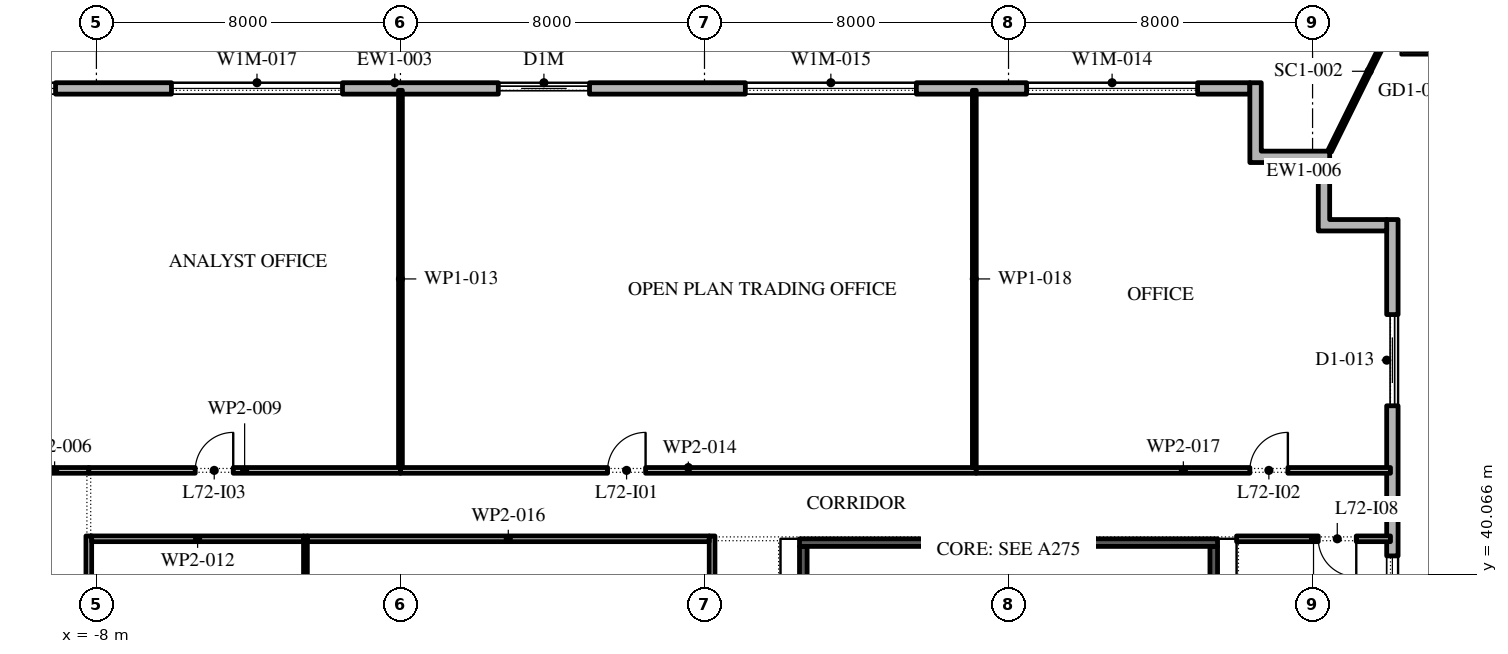
"""IFC4 building model, lengths in metres.
Left out: names, types, materials, properties, quantities, classifications, styles, units other than length and angle.
Written with IfcOpenShell. Run it as: python <this file> out.ifc"""

import sys

from ifc_helpers import new_model, si_unit, direction, frame, frame_2d, origin, place, context, subcontext, project, spatial, polyline, rectangle, outline, extrude, element, fill, save


model = new_model("IFC4")
c1 = context("Model", 3, precision=1e-05, world=origin(), true_north=direction((0.0, 1.0)))
c2 = subcontext(c1, "Body", "Model", "MODEL_VIEW")
j1 = project(units=[si_unit("LENGTHUNIT", "METRE"), si_unit("PLANEANGLEUNIT", "RADIAN")], contexts=[c1])
p1 = place(None, origin())
s1 = spatial("IfcSite", under=j1, at=p1, CompositionType="ELEMENT")
p2 = place(p1, origin())
s2 = spatial("IfcBuilding", under=s1, at=p2, CompositionType="ELEMENT")
p3 = place(p2, frame((0.0, 0.0, 330.0)))
s3 = spatial("IfcBuildingStorey", under=s2, at=p3, CompositionType="ELEMENT", Elevation=330.0)
p4 = place(p3, frame((26.1, -2.1, 0.0), z_axis=(0.0, 0.0, 1.0), x_axis=(0.0, 1.0, 0.0)))
e1 = element("IfcWall", 1, at=p4, inside=s3, PredefinedType="STANDARD", context=c2, shape_type="SweptSolid", body=[
    extrude(rectangle(XDim=51.5, YDim=0.3, at=frame_2d((25.75, 0.0))), origin(), (0.0, 0.0, 1.0), 4.0),
])
p5 = place(p4, frame((1.3, 0.0, 0.45)))
e2 = element("IfcOpeningElement", 2, at=p5, cuts=e1, PredefinedType="OPENING", context=c2, shape_type="SweptSolid", body=[
    extrude(rectangle(XDim=4.5, YDim=3.05, at=frame_2d((2.25, 1.525))), frame((0.0, 0.16, 0.0), z_axis=(0.0, -1.0, 0.0), x_axis=(1.0, 0.0, 0.0)), (0.0, 0.0, 1.0), 0.32),
])
p6 = place(p4, frame((8.55, 0.0, 0.45)))
e3 = element("IfcOpeningElement", 3, at=p6, cuts=e1, PredefinedType="OPENING", context=c2, shape_type="SweptSolid", body=[
    extrude(rectangle(XDim=4.5, YDim=3.05, at=frame_2d((2.25, 1.525))), frame((0.0, 0.16, 0.0), z_axis=(0.0, -1.0, 0.0), x_axis=(1.0, 0.0, 0.0)), (0.0, 0.0, 1.0), 0.32),
])
p7 = place(p4, frame((17.0, 0.0, 0.0)))
e4 = element("IfcOpeningElement", 4, at=p7, cuts=e1, PredefinedType="OPENING", context=c2, shape_type="SweptSolid", body=[
    extrude(rectangle(XDim=2.4, YDim=3.5, at=frame_2d((1.2, 1.75))), frame((0.0, 0.16, 0.0), z_axis=(0.0, -1.0, 0.0), x_axis=(1.0, 0.0, 0.0)), (0.0, 0.0, 1.0), 0.32),
])
p8 = place(p4, frame((23.35, 0.0, 0.45)))
e5 = element("IfcOpeningElement", 5, at=p8, cuts=e1, PredefinedType="OPENING", context=c2, shape_type="SweptSolid", body=[
    extrude(rectangle(XDim=4.5, YDim=3.05, at=frame_2d((2.25, 1.525))), frame((0.0, 0.16, 0.0), z_axis=(0.0, -1.0, 0.0), x_axis=(1.0, 0.0, 0.0)), (0.0, 0.0, 1.0), 0.32),
])
p9 = place(p4, frame((30.75, 0.0, 0.45)))
e6 = element("IfcOpeningElement", 6, at=p9, cuts=e1, PredefinedType="OPENING", context=c2, shape_type="SweptSolid", body=[
    extrude(rectangle(XDim=4.5, YDim=3.05, at=frame_2d((2.25, 1.525))), frame((0.0, 0.16, 0.0), z_axis=(0.0, -1.0, 0.0), x_axis=(1.0, 0.0, 0.0)), (0.0, 0.0, 1.0), 0.32),
])
p10 = place(p4, frame((38.15, 0.0, 0.45)))
e7 = element("IfcOpeningElement", 7, at=p10, cuts=e1, PredefinedType="OPENING", context=c2, shape_type="SweptSolid", body=[
    extrude(rectangle(XDim=4.5, YDim=3.05, at=frame_2d((2.25, 1.525))), frame((0.0, 0.16, 0.0), z_axis=(0.0, -1.0, 0.0), x_axis=(1.0, 0.0, 0.0)), (0.0, 0.0, 1.0), 0.32),
])
p11 = place(p4, frame((46.6, 0.0, 0.0)))
e8 = element("IfcOpeningElement", 8, at=p11, cuts=e1, PredefinedType="OPENING", context=c2, shape_type="SweptSolid", body=[
    extrude(rectangle(XDim=2.4, YDim=3.5, at=frame_2d((1.2, 1.75))), frame((0.0, 0.16, 0.0), z_axis=(0.0, -1.0, 0.0), x_axis=(1.0, 0.0, 0.0)), (0.0, 0.0, 1.0), 0.32),
])
p12 = place(p3, frame((22.35, 52.85, 0.0), z_axis=(0.0, 0.0, 1.0), x_axis=(-1.0, 0.0, 0.0)))
e9 = element("IfcWall", 9, at=p12, inside=s3, PredefinedType="STANDARD", context=c2, shape_type="SweptSolid", body=[
    extrude(rectangle(XDim=45.0, YDim=0.3, at=frame_2d((22.5, 0.0))), origin(), (0.0, 0.0, 1.0), 4.0),
])
p13 = place(p12, frame((1.375, 0.0, 0.45)))
e10 = element("IfcOpeningElement", 10, at=p13, cuts=e9, PredefinedType="OPENING", context=c2, shape_type="SweptSolid", body=[
    extrude(rectangle(XDim=4.5, YDim=2.575, at=frame_2d((2.25, 1.288))), frame((0.0, 0.16, 0.0), z_axis=(0.0, -1.0, 0.0), x_axis=(1.0, 0.0, 0.0)), (0.0, 0.0, 1.0), 0.32),
])
p14 = place(p12, frame((8.775, 0.0, 0.45)))
e11 = element("IfcOpeningElement", 11, at=p14, cuts=e9, PredefinedType="OPENING", context=c2, shape_type="SweptSolid", body=[
    extrude(rectangle(XDim=4.5, YDim=2.575, at=frame_2d((2.25, 1.288))), frame((0.0, 0.16, 0.0), z_axis=(0.0, -1.0, 0.0), x_axis=(1.0, 0.0, 0.0)), (0.0, 0.0, 1.0), 0.32),
])
p15 = place(p12, frame((17.375, 0.0, 0.0)))
e12 = element("IfcOpeningElement", 12, at=p15, cuts=e9, PredefinedType="OPENING", context=c2, shape_type="SweptSolid", body=[
    extrude(rectangle(XDim=2.4, YDim=3.025, at=frame_2d((1.2, 1.512))), frame((0.0, 0.16, 0.0), z_axis=(0.0, -1.0, 0.0), x_axis=(1.0, 0.0, 0.0)), (0.0, 0.0, 1.0), 0.32),
])
p16 = place(p12, frame((23.875, 0.0, 0.45)))
e13 = element("IfcOpeningElement", 13, at=p16, cuts=e9, PredefinedType="OPENING", context=c2, shape_type="SweptSolid", body=[
    extrude(rectangle(XDim=4.5, YDim=2.575, at=frame_2d((2.25, 1.288))), frame((0.0, 0.16, 0.0), z_axis=(0.0, -1.0, 0.0), x_axis=(1.0, 0.0, 0.0)), (0.0, 0.0, 1.0), 0.32),
])
p17 = place(p12, frame((31.425, 0.0, 0.45)))
e14 = element("IfcOpeningElement", 14, at=p17, cuts=e9, PredefinedType="OPENING", context=c2, shape_type="SweptSolid", body=[
    extrude(rectangle(XDim=4.5, YDim=2.575, at=frame_2d((2.25, 1.288))), frame((0.0, 0.16, 0.0), z_axis=(0.0, -1.0, 0.0), x_axis=(1.0, 0.0, 0.0)), (0.0, 0.0, 1.0), 0.32),
])
p18 = place(p12, frame((38.975, 0.0, 0.45)))
e15 = element("IfcOpeningElement", 15, at=p18, cuts=e9, PredefinedType="OPENING", context=c2, shape_type="SweptSolid", body=[
    extrude(rectangle(XDim=4.5, YDim=2.575, at=frame_2d((2.25, 1.288))), frame((0.0, 0.16, 0.0), z_axis=(0.0, -1.0, 0.0), x_axis=(1.0, 0.0, 0.0)), (0.0, 0.0, 1.0), 0.32),
])
p19 = place(p3, origin())
e16 = element("IfcWall", 16, at=p19, inside=s3, PredefinedType="STANDARD", context=c2, shape_type="SweptSolid", body=[
    extrude(outline(polyline([(24.15, 50.9), (22.35, 50.9), (22.35, 53.0), (22.65, 53.0), (22.65, 51.2), (24.45, 51.2), (24.45, 49.4), (25.95, 49.4), (25.95, 49.1), (24.15, 49.1), (24.15, 50.9)])), origin(), (0.0, 0.0, 1.0), 4.0),
])
p20 = place(p3, frame((24.45, 51.2, -0.05), z_axis=(0.0, 0.0, 1.0), x_axis=(0.443209769794, 0.896417927063, 0.0)))
e17 = element("IfcWall", 17, at=p20, inside=s3, PredefinedType="STANDARD", context=c2, shape_type="SweptSolid", body=[
    extrude(rectangle(XDim=4.688, YDim=0.1, at=frame_2d((2.344, 0.0))), origin(), (0.0, 0.0, 1.0), 4.05),
])
p21 = place(p3, frame((21.4, 25.75, 0.0), z_axis=(0.0, 0.0, 1.0), x_axis=(0.0, 1.0, 0.0)))
e18 = element("IfcWall", 18, at=p21, inside=s3, PredefinedType="SHEAR", context=c2, shape_type="SweptSolid", body=[
    extrude(rectangle(XDim=15.05, YDim=0.2, at=frame_2d((7.525, 0.0))), origin(), (0.0, 0.0, 1.0), 4.0),
])
p22 = place(p3, frame((10.6, 25.75, 0.0), z_axis=(0.0, 0.0, 1.0), x_axis=(0.0, 1.0, 0.0)))
e19 = element("IfcWall", 19, at=p22, inside=s3, PredefinedType="SHEAR", context=c2, shape_type="SweptSolid", body=[
    extrude(rectangle(XDim=15.05, YDim=0.2, at=frame_2d((7.525, 0.0))), origin(), (0.0, 0.0, 1.0), 4.0),
])
p23 = place(p22, frame((3.288, 0.0, 0.0)))
e20 = element("IfcOpeningElement", 20, at=p23, cuts=e19, PredefinedType="OPENING", context=c2, shape_type="SweptSolid", body=[
    extrude(rectangle(XDim=0.9, YDim=2.1, at=frame_2d((0.45, 1.05))), frame((0.0, 0.11, 0.0), z_axis=(0.0, -1.0, 0.0), x_axis=(1.0, 0.0, 0.0)), (0.0, 0.0, 1.0), 0.22),
])
p24 = place(p22, frame((10.887, 0.0, 0.0)))
e21 = element("IfcOpeningElement", 21, at=p24, cuts=e19, PredefinedType="OPENING", context=c2, shape_type="SweptSolid", body=[
    extrude(rectangle(XDim=0.9, YDim=2.1, at=frame_2d((0.45, 1.05))), frame((0.0, 0.11, 0.0), z_axis=(0.0, -1.0, 0.0), x_axis=(1.0, 0.0, 0.0)), (0.0, 0.0, 1.0), 0.22),
])
p25 = place(p3, frame((10.5, 40.9, 0.0), z_axis=(0.0, 0.0, 1.0), x_axis=(1.0, 0.0, 0.0)))
e22 = element("IfcWall", 22, at=p25, inside=s3, PredefinedType="SHEAR", context=c2, shape_type="SweptSolid", body=[
    extrude(rectangle(XDim=11.0, YDim=0.2, at=frame_2d((5.5, 0.0))), origin(), (0.0, 0.0, 1.0), 4.0),
])
p26 = place(p3, frame((-10.0, 42.8, 0.0), z_axis=(0.0, 0.0, 1.0), x_axis=(1.0, 0.0, 0.0)))
e23 = element("IfcWall", 23, at=p26, inside=s3, PredefinedType="PARTITIONING", context=c2, shape_type="SweptSolid", body=[
    extrude(rectangle(XDim=1.8, YDim=0.15, at=frame_2d((0.9, 0.0))), origin(), (0.0, 0.0, 1.0), 4.0),
])
p27 = place(p3, frame((-8.2, 41.075, 0.0), z_axis=(0.0, 0.0, 1.0), x_axis=(0.0, -1.0, 0.0)))
e24 = element("IfcWall", 24, at=p27, inside=s3, PredefinedType="PARTITIONING", context=c2, shape_type="SweptSolid", body=[
    extrude(rectangle(XDim=22.0, YDim=0.15, at=frame_2d((11.0, 0.0))), origin(), (0.0, 0.0, 1.0), 4.0),
])
p28 = place(p27, frame((10.675, 0.0, 0.0)))
e25 = element("IfcOpeningElement", 25, at=p28, cuts=e24, PredefinedType="OPENING", context=c2, shape_type="SweptSolid", body=[
    extrude(rectangle(XDim=1.0, YDim=2.1, at=frame_2d((0.5, 1.05))), frame((0.0, 0.085, 0.0), z_axis=(0.0, -1.0, 0.0), x_axis=(1.0, 0.0, 0.0)), (0.0, 0.0, 1.0), 0.17),
])
p29 = place(p3, frame((-8.2, 42.8, 0.0), z_axis=(0.0, 0.0, 1.0), x_axis=(1.0, 0.0, 0.0)))
e26 = element("IfcWall", 26, at=p29, inside=s3, PredefinedType="PARTITIONING", context=c2, shape_type="SweptSolid", body=[
    extrude(rectangle(XDim=8.2, YDim=0.15, at=frame_2d((4.1, 0.0))), origin(), (0.0, 0.0, 1.0), 4.0),
])
p30 = place(p29, frame((2.8, 0.0, 0.0)))
e27 = element("IfcOpeningElement", 27, at=p30, cuts=e26, PredefinedType="OPENING", context=c2, shape_type="SweptSolid", body=[
    extrude(rectangle(XDim=1.0, YDim=2.1, at=frame_2d((0.5, 1.05))), frame((0.0, 0.085, 0.0), z_axis=(0.0, -1.0, 0.0), x_axis=(1.0, 0.0, 0.0)), (0.0, 0.0, 1.0), 0.17),
])
p31 = place(p3, frame((-2.5, 19.075, 0.0), z_axis=(0.0, 0.0, 1.0), x_axis=(0.0, 1.0, 0.0)))
e28 = element("IfcWall", 28, at=p31, inside=s3, PredefinedType="PARTITIONING", context=c2, shape_type="SweptSolid", body=[
    extrude(rectangle(XDim=22.0, YDim=0.1, at=frame_2d((11.0, 0.0))), origin(), (0.0, 0.0, 1.0), 4.0),
])
p32 = place(p3, frame((-2.55, 41.0, 0.0), z_axis=(0.0, 0.0, 1.0), x_axis=(-1.0, 0.0, 0.0)))
e29 = element("IfcWall", 29, at=p32, inside=s3, PredefinedType="PARTITIONING", context=c2, shape_type="SweptSolid", body=[
    extrude(rectangle(XDim=5.575, YDim=0.15, at=frame_2d((2.788, 0.0))), origin(), (0.0, 0.0, 1.0), 4.0),
])
p33 = place(p3, frame((0.0, 42.875, 0.0), z_axis=(0.0, 0.0, 1.0), x_axis=(0.0, 1.0, 0.0)))
e30 = element("IfcWall", 30, at=p33, inside=s3, PredefinedType="PARTITIONING", context=c2, shape_type="SweptSolid", body=[
    extrude(rectangle(XDim=9.925, YDim=0.1, at=frame_2d((4.962, 0.0))), origin(), (0.0, 0.0, 1.0), 4.0),
])
p34 = place(p3, frame((0.0, 42.8, 0.0), z_axis=(0.0, 0.0, 1.0), x_axis=(1.0, 0.0, 0.0)))
e31 = element("IfcWall", 31, at=p34, inside=s3, PredefinedType="PARTITIONING", context=c2, shape_type="SweptSolid", body=[
    extrude(rectangle(XDim=15.15, YDim=0.15, at=frame_2d((7.575, 0.0))), origin(), (0.0, 0.0, 1.0), 4.0),
])
p35 = place(p34, frame((5.45, 0.0, 0.0)))
e32 = element("IfcOpeningElement", 32, at=p35, cuts=e31, PredefinedType="OPENING", context=c2, shape_type="SweptSolid", body=[
    extrude(rectangle(XDim=1.0, YDim=2.1, at=frame_2d((0.5, 1.05))), frame((0.0, 0.085, 0.0), z_axis=(0.0, -1.0, 0.0), x_axis=(1.0, 0.0, 0.0)), (0.0, 0.0, 1.0), 0.17),
])
p36 = place(p3, frame((8.2, 19.075, 0.0), z_axis=(0.0, 0.0, 1.0), x_axis=(0.0, 1.0, 0.0)))
e33 = element("IfcWall", 33, at=p36, inside=s3, PredefinedType="PARTITIONING", context=c2, shape_type="SweptSolid", body=[
    extrude(rectangle(XDim=22.0, YDim=0.15, at=frame_2d((11.0, 0.0))), origin(), (0.0, 0.0, 1.0), 4.0),
])
p37 = place(p36, frame((7.725, 0.0, 0.0)))
e34 = element("IfcOpeningElement", 34, at=p37, cuts=e33, PredefinedType="OPENING", context=c2, shape_type="SweptSolid", body=[
    extrude(rectangle(XDim=1.8, YDim=2.1, at=frame_2d((0.9, 1.05))), frame((0.0, 0.085, 0.0), z_axis=(0.0, -1.0, 0.0), x_axis=(1.0, 0.0, 0.0)), (0.0, 0.0, 1.0), 0.17),
])
p38 = place(p3, frame((8.125, 41.0, 0.0), z_axis=(0.0, 0.0, 1.0), x_axis=(-1.0, 0.0, 0.0)))
e35 = element("IfcWall", 35, at=p38, inside=s3, PredefinedType="PARTITIONING", context=c2, shape_type="SweptSolid", body=[
    extrude(rectangle(XDim=10.575, YDim=0.15, at=frame_2d((5.288, 0.0))), origin(), (0.0, 0.0, 1.0), 4.0),
])
p39 = place(p3, frame((15.15, 42.8, 0.0), z_axis=(0.0, 0.0, 1.0), x_axis=(1.0, 0.0, 0.0)))
e36 = element("IfcWall", 36, at=p39, inside=s3, PredefinedType="PARTITIONING", context=c2, shape_type="SweptSolid", body=[
    extrude(rectangle(XDim=10.9, YDim=0.15, at=frame_2d((5.45, 0.0))), origin(), (0.0, 0.0, 1.0), 4.0),
])
p40 = place(p39, frame((7.2, 0.0, 0.0)))
e37 = element("IfcOpeningElement", 37, at=p40, cuts=e36, PredefinedType="OPENING", context=c2, shape_type="SweptSolid", body=[
    extrude(rectangle(XDim=1.0, YDim=2.1, at=frame_2d((0.5, 1.05))), frame((0.0, 0.085, 0.0), z_axis=(0.0, -1.0, 0.0), x_axis=(1.0, 0.0, 0.0)), (0.0, 0.0, 1.0), 0.17),
])
p41 = place(p3, frame((15.1, 52.8, 0.0), z_axis=(0.0, 0.0, 1.0), x_axis=(0.0, -1.0, 0.0)))
e38 = element("IfcWall", 38, at=p41, inside=s3, PredefinedType="PARTITIONING", context=c2, shape_type="SweptSolid", body=[
    extrude(rectangle(XDim=9.925, YDim=0.1, at=frame_2d((4.962, 0.0))), origin(), (0.0, 0.0, 1.0), 4.0),
])
p42 = place(p3, frame((26.05, 41.0, 0.0), z_axis=(0.0, 0.0, 1.0), x_axis=(-1.0, 0.0, 0.0)))
e39 = element("IfcWall", 39, at=p42, inside=s3, PredefinedType="PARTITIONING", context=c2, shape_type="SweptSolid", body=[
    extrude(rectangle(XDim=4.05, YDim=0.15, at=frame_2d((2.025, 0.0))), origin(), (0.0, 0.0, 1.0), 4.0),
])
p43 = place(p42, frame((0.9, 0.0, 0.0)))
e40 = element("IfcOpeningElement", 40, at=p43, cuts=e39, PredefinedType="OPENING", context=c2, shape_type="SweptSolid", body=[
    extrude(rectangle(XDim=1.0, YDim=2.1, at=frame_2d((0.5, 1.05))), frame((0.0, 0.085, 0.0), z_axis=(0.0, -1.0, 0.0), x_axis=(1.0, 0.0, 0.0)), (0.0, 0.0, 1.0), 0.17),
])
p44 = place(p10, origin())
e41 = element("IfcWindow", 41, at=p44, inside=s3, PartitioningType="DOUBLE_PANEL_VERTICAL", PredefinedType="WINDOW", context=c2, shape_type="SweptSolid", body=[
    extrude(rectangle(XDim=4.5, YDim=3.05, at=frame_2d((2.25, 1.525))), frame((0.0, 0.03, 0.0), z_axis=(0.0, -1.0, 0.0), x_axis=(1.0, 0.0, 0.0)), (0.0, 0.0, 1.0), 0.06),
])
fill(e7, e41)
p45 = place(p11, origin())
e42 = element("IfcDoor", 42, at=p45, inside=s3, OperationType="DOUBLE_DOOR_SLIDING", PredefinedType="DOOR", context=c2, shape_type="SweptSolid", body=[
    extrude(rectangle(XDim=2.4, YDim=3.5, at=frame_2d((1.2, 1.75))), frame((0.0, 0.025, 0.0), z_axis=(0.0, -1.0, 0.0), x_axis=(1.0, 0.0, 0.0)), (0.0, 0.0, 1.0), 0.05),
])
fill(e8, e42)
p46 = place(p13, origin())
e43 = element("IfcWindow", 43, at=p46, inside=s3, PartitioningType="DOUBLE_PANEL_VERTICAL", PredefinedType="WINDOW", context=c2, shape_type="SweptSolid", body=[
    extrude(rectangle(XDim=4.5, YDim=2.575, at=frame_2d((2.25, 1.288))), frame((0.0, 0.03, 0.0), z_axis=(0.0, -1.0, 0.0), x_axis=(1.0, 0.0, 0.0)), (0.0, 0.0, 1.0), 0.06),
])
fill(e10, e43)
p47 = place(p14, origin())
e44 = element("IfcWindow", 44, at=p47, inside=s3, PartitioningType="DOUBLE_PANEL_VERTICAL", PredefinedType="WINDOW", context=c2, shape_type="SweptSolid", body=[
    extrude(rectangle(XDim=4.5, YDim=2.575, at=frame_2d((2.25, 1.288))), frame((0.0, 0.03, 0.0), z_axis=(0.0, -1.0, 0.0), x_axis=(1.0, 0.0, 0.0)), (0.0, 0.0, 1.0), 0.06),
])
fill(e11, e44)
p48 = place(p15, origin())
e45 = element("IfcDoor", 45, at=p48, inside=s3, OperationType="DOUBLE_DOOR_SLIDING", PredefinedType="DOOR", context=c2, shape_type="SweptSolid", body=[
    extrude(rectangle(XDim=2.4, YDim=3.025, at=frame_2d((1.2, 1.512))), frame((0.0, 0.025, 0.0), z_axis=(0.0, -1.0, 0.0), x_axis=(1.0, 0.0, 0.0)), (0.0, 0.0, 1.0), 0.05),
])
fill(e12, e45)
p49 = place(p16, origin())
e46 = element("IfcWindow", 46, at=p49, inside=s3, PartitioningType="DOUBLE_PANEL_VERTICAL", PredefinedType="WINDOW", context=c2, shape_type="SweptSolid", body=[
    extrude(rectangle(XDim=4.5, YDim=2.575, at=frame_2d((2.25, 1.288))), frame((0.0, 0.03, 0.0), z_axis=(0.0, -1.0, 0.0), x_axis=(1.0, 0.0, 0.0)), (0.0, 0.0, 1.0), 0.06),
])
fill(e13, e46)
p50 = place(p17, origin())
e47 = element("IfcWindow", 47, at=p50, inside=s3, PartitioningType="DOUBLE_PANEL_VERTICAL", PredefinedType="WINDOW", context=c2, shape_type="SweptSolid", body=[
    extrude(rectangle(XDim=4.5, YDim=2.575, at=frame_2d((2.25, 1.288))), frame((0.0, 0.03, 0.0), z_axis=(0.0, -1.0, 0.0), x_axis=(1.0, 0.0, 0.0)), (0.0, 0.0, 1.0), 0.06),
])
fill(e14, e47)
p51 = place(p35, origin())
e48 = element("IfcDoor", 48, at=p51, inside=s3, OperationType="SINGLE_SWING_LEFT", PredefinedType="DOOR", context=c2, shape_type="SweptSolid", body=[
    extrude(rectangle(XDim=1.0, YDim=2.1, at=frame_2d((0.5, 1.05))), frame((0.0, 0.025, 0.0), z_axis=(0.0, -1.0, 0.0), x_axis=(1.0, 0.0, 0.0)), (0.0, 0.0, 1.0), 0.05),
])
fill(e32, e48)
p52 = place(p40, origin())
e49 = element("IfcDoor", 49, at=p52, inside=s3, OperationType="SINGLE_SWING_LEFT", PredefinedType="DOOR", context=c2, shape_type="SweptSolid", body=[
    extrude(rectangle(XDim=1.0, YDim=2.1, at=frame_2d((0.5, 1.05))), frame((0.0, 0.025, 0.0), z_axis=(0.0, -1.0, 0.0), x_axis=(1.0, 0.0, 0.0)), (0.0, 0.0, 1.0), 0.05),
])
fill(e37, e49)
p53 = place(p30, origin())
e50 = element("IfcDoor", 50, at=p53, inside=s3, OperationType="SINGLE_SWING_LEFT", PredefinedType="DOOR", context=c2, shape_type="SweptSolid", body=[
    extrude(rectangle(XDim=1.0, YDim=2.1, at=frame_2d((0.5, 1.05))), frame((0.0, 0.025, 0.0), z_axis=(0.0, -1.0, 0.0), x_axis=(1.0, 0.0, 0.0)), (0.0, 0.0, 1.0), 0.05),
])
fill(e27, e50)
p54 = place(p43, origin())
e51 = element("IfcDoor", 51, at=p54, inside=s3, OperationType="SINGLE_SWING_RIGHT", PredefinedType="DOOR", context=c2, shape_type="SweptSolid", body=[
    extrude(rectangle(XDim=1.0, YDim=2.1, at=frame_2d((0.5, 1.05))), frame((0.0, 0.025, 0.0), z_axis=(0.0, -1.0, 0.0), x_axis=(1.0, 0.0, 0.0)), (0.0, 0.0, 1.0), 0.05),
])
fill(e40, e51)
save(model, sys.argv[1])
